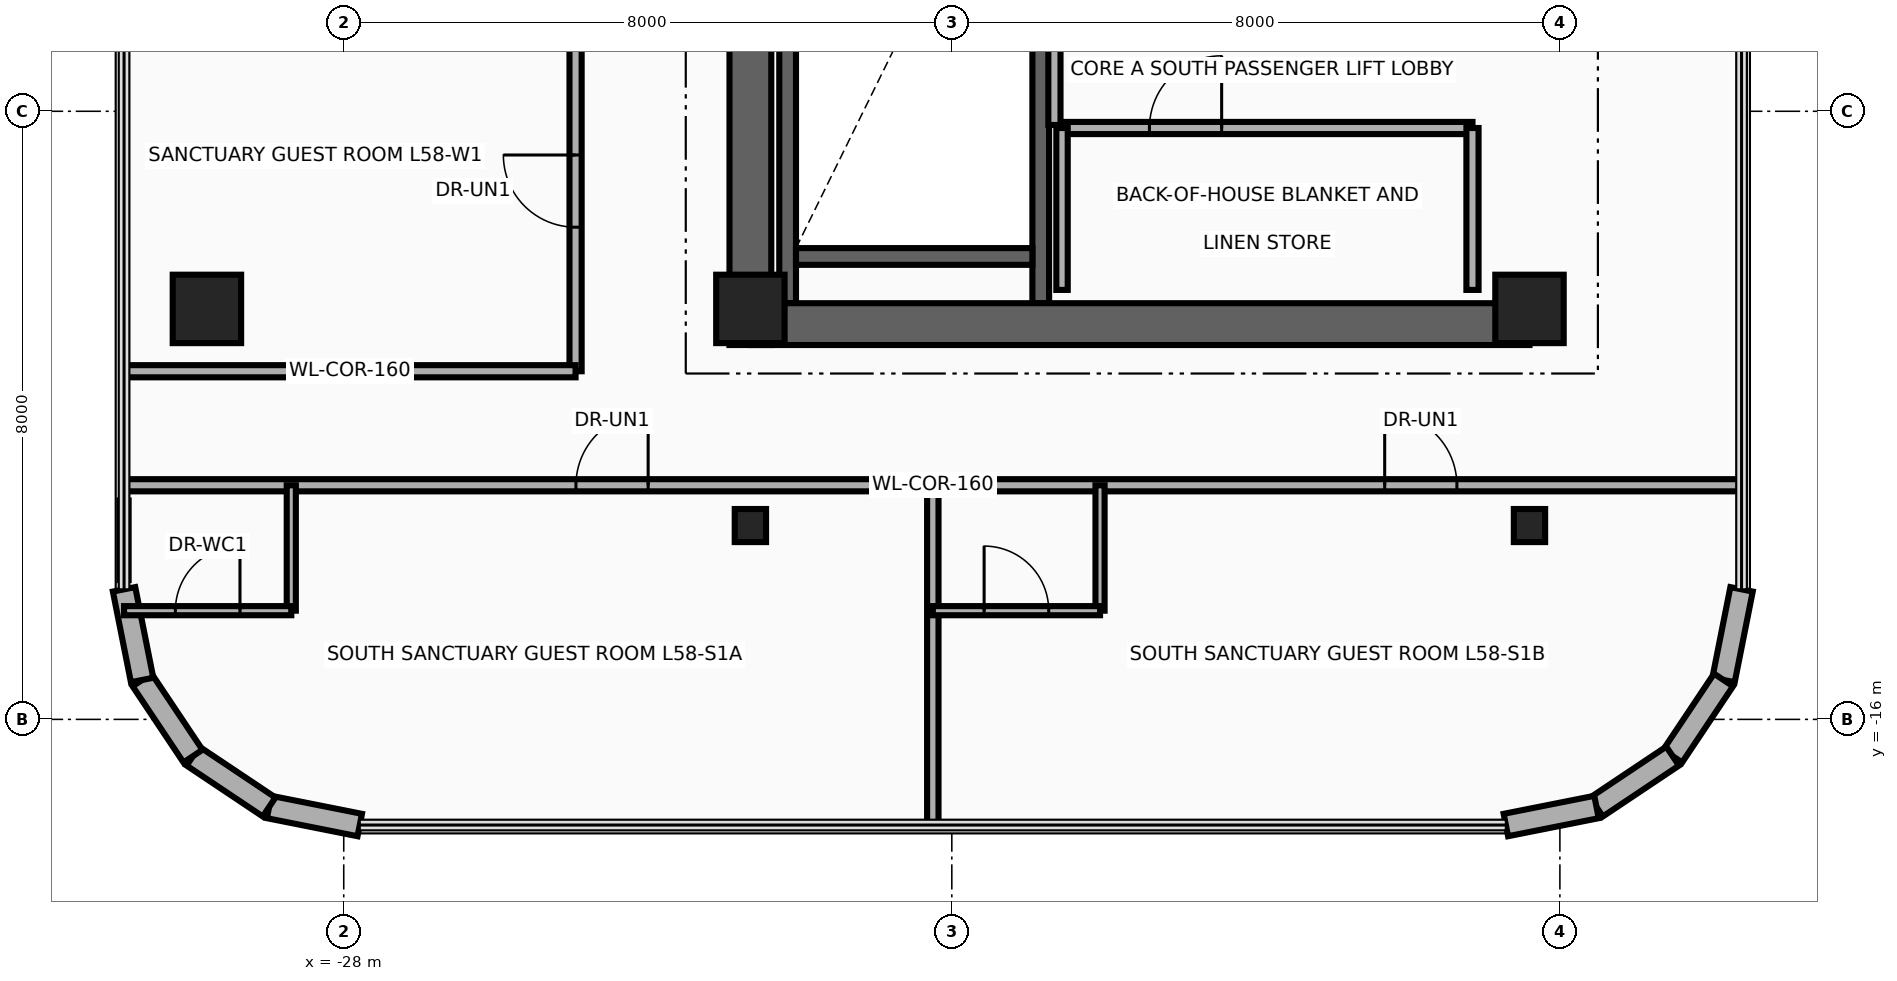
"""IFC4 building model, lengths in metres.
Left out: names, types, materials, properties, quantities, classifications, styles, units other than length and angle.
Written with IfcOpenShell. Run it as: python <this file> out.ifc"""

import sys

from ifc_helpers import new_model, si_unit, direction, frame, frame_2d, origin, origin_2d, place, context, subcontext, project, spatial, rectangle, i_section, extrude, source, transform, mapped, element, fill, save


model = new_model("IFC4")
c1 = context("Model", 3, precision=1e-05, world=origin(), true_north=direction((0.0, 1.0)))
c2 = subcontext(c1, "Body", "Model", "MODEL_VIEW")
j1 = project(units=[si_unit("LENGTHUNIT", "METRE"), si_unit("PLANEANGLEUNIT", "RADIAN")], contexts=[c1])
p1 = place(None, origin())
s1 = spatial("IfcSite", under=j1, at=p1, CompositionType="ELEMENT")
p2 = place(p1, origin())
s2 = spatial("IfcBuilding", under=s1, at=p2, CompositionType="ELEMENT")
p3 = place(p2, frame((0.0, 0.0, 226.5)))
s3 = spatial("IfcBuildingStorey", under=s2, at=p3, CompositionType="ELEMENT", Elevation=226.5)
for number, where, z_axis, x_axis in (
    (1, (-22.16, -10.525, 0.0), (0.0, 0.0, 1.0), (0.0, 1.0, 0.0)),
    (2, (-18.83, -10.525, 0.0), (0.0, 0.0, 1.0), (0.0, 1.0, 0.0)),
):
    element("IfcWall", number, at=place(p3, frame(where, z_axis=z_axis, x_axis=x_axis)), inside=s3, PredefinedType="SHEAR", context=c2, shape_type="SweptSolid", body=[
        extrude(rectangle(XDim=8.745, YDim=0.22, at=frame_2d((4.373, 0.0))), origin(), (0.0, 0.0, 1.0), 3.26),
    ])
p4 = place(p3, frame((-22.05, -9.91, 0.0), z_axis=(0.0, 0.0, 1.0), x_axis=(1.0, 0.0, 0.0)))
e3 = element("IfcWall", 3, at=p4, inside=s3, PredefinedType="SHEAR", context=c2, shape_type="SweptSolid", body=[
    extrude(rectangle(XDim=3.11, YDim=0.22, at=frame_2d((1.555, 0.0))), origin(), (0.0, 0.0, 1.0), 3.26),
])
p5 = place(p3, frame((-22.65, -11.075, 0.0), z_axis=(0.0, 0.0, 1.0), x_axis=(0.0, 1.0, 0.0)))
e4 = element("IfcWall", 4, at=p5, inside=s3, PredefinedType="SHEAR", context=c2, shape_type="SweptSolid", body=[
    extrude(rectangle(XDim=22.15, YDim=0.55, at=frame_2d((11.075, 0.0))), origin(), (0.0, 0.0, 1.0), 3.26),
])
p6 = place(p3, frame((-22.65, -10.8, 0.0), z_axis=(0.0, 0.0, 1.0), x_axis=(1.0, 0.0, 0.0)))
e5 = element("IfcWall", 5, at=p6, inside=s3, PredefinedType="SHEAR", context=c2, shape_type="SweptSolid", body=[
    extrude(rectangle(XDim=10.25, YDim=0.55, at=frame_2d((5.125, 0.0))), origin(), (0.0, 0.0, 1.0), 3.26),
])
m1 = source(origin(), c2, "Body", "SweptSolid", [
    extrude(rectangle(XDim=0.9, YDim=0.9, at=origin_2d()), origin(), (0.0, 0.0, 1.0), 3.5),
])
for number, where, z_axis, x_axis in (
    (6, (-29.8, -10.6, 0.0), (0.0, 0.0, 1.0), (1.0, 0.0, 0.0)),
    (7, (-22.65, -10.6, 0.0), (0.0, 0.0, 1.0), (1.0, 0.0, 0.0)),
    (8, (-12.4, -10.6, 0.0), (0.0, 0.0, 1.0), (1.0, 0.0, 0.0)),
):
    element("IfcColumn", number, at=place(p3, frame(where, z_axis=z_axis, x_axis=x_axis)), inside=s3, PredefinedType="COLUMN", context=c2, shape_type="MappedRepresentation", body=[
        mapped(m1, transform((0.0, 0.0, 0.0), x_axis=(1.0, 0.0, 0.0), y_axis=(0.0, 1.0, 0.0), z_axis=(0.0, 0.0, 1.0), scale=1.0)),
    ])
m2 = source(origin(), c2, "Body", "SweptSolid", [
    extrude(i_section(OverallWidth=0.412, OverallDepth=0.435, WebThickness=0.036, FlangeThickness=0.057, at=origin_2d()), origin(), (0.0, 0.0, 1.0), 3.5),
])
for number, where, z_axis, x_axis in (
    (9, (-22.65, -13.45, 0.0), (0.0, 0.0, 1.0), (1.0, 0.0, 0.0)),
    (10, (-12.4, -13.45, 0.0), (0.0, 0.0, 1.0), (1.0, 0.0, 0.0)),
):
    element("IfcColumn", number, at=place(p3, frame(where, z_axis=z_axis, x_axis=x_axis)), inside=s3, PredefinedType="COLUMN", context=c2, shape_type="MappedRepresentation", body=[
        mapped(m2, transform((0.0, 0.0, 0.0), x_axis=(1.0, 0.0, 0.0), y_axis=(0.0, 1.0, 0.0), z_axis=(0.0, 0.0, 1.0), scale=1.0)),
    ])
p7 = place(p3, frame((-9.61, -14.289, 0.0), z_axis=(0.0, 0.0, 1.0), x_axis=(-0.194996050505, -0.980804027463, 0.0)))
e11 = element("IfcWall", 11, at=p7, inside=s3, PredefinedType="SOLIDWALL", context=c2, shape_type="SweptSolid", body=[
    extrude(rectangle(XDim=1.216, YDim=0.3, at=frame_2d((0.608, 0.0))), origin(), (0.0, 0.0, 1.0), 3.26),
])
for number, where, z_axis, x_axis in (
    (12, (-9.847, -15.482, 0.0), (0.0, 0.0, 1.0), (-0.556, -0.831, 0.0)),
    (13, (-10.517, -16.483, 0.0), (0.0, 0.0, 1.0), (-0.831, -0.556, 0.0)),
):
    element("IfcWall", number, at=place(p3, frame(where, z_axis=z_axis, x_axis=x_axis)), inside=s3, PredefinedType="SOLIDWALL", context=c2, shape_type="SweptSolid", body=[
        extrude(rectangle(XDim=1.205, YDim=0.3, at=frame_2d((0.603, 0.0))), origin(), (0.0, 0.0, 1.0), 3.26),
    ])
for number, where, z_axis, x_axis in (
    (14, (-11.518, -17.153, 0.0), (0.0, 0.0, 1.0), (-0.981, -0.195, 0.0)),
    (15, (-27.789, -17.39, 0.0), (0.0, 0.0, 1.0), (-0.981, 0.195, 0.0)),
):
    element("IfcWall", number, at=place(p3, frame(where, z_axis=z_axis, x_axis=x_axis)), inside=s3, PredefinedType="SOLIDWALL", context=c2, shape_type="SweptSolid", body=[
        extrude(rectangle(XDim=1.216, YDim=0.3, at=frame_2d((0.608, 0.0))), origin(), (0.0, 0.0, 1.0), 3.26),
    ])
for number, where, z_axis, x_axis in (
    (16, (-28.982, -17.153, 0.0), (0.0, 0.0, 1.0), (-0.831, 0.556, 0.0)),
    (17, (-29.983, -16.483, 0.0), (0.0, 0.0, 1.0), (-0.556, 0.831, 0.0)),
):
    element("IfcWall", number, at=place(p3, frame(where, z_axis=z_axis, x_axis=x_axis)), inside=s3, PredefinedType="SOLIDWALL", context=c2, shape_type="SweptSolid", body=[
        extrude(rectangle(XDim=1.205, YDim=0.3, at=frame_2d((0.603, 0.0))), origin(), (0.0, 0.0, 1.0), 3.26),
    ])
p8 = place(p3, frame((-30.653, -15.482, 0.0), z_axis=(0.0, 0.0, 1.0), x_axis=(-0.194996050505, 0.980804027463, 0.0)))
e18 = element("IfcWall", 18, at=p8, inside=s3, PredefinedType="SOLIDWALL", context=c2, shape_type="SweptSolid", body=[
    extrude(rectangle(XDim=1.216, YDim=0.3, at=frame_2d((0.608, 0.0))), origin(), (0.0, 0.0, 1.0), 3.26),
])
p9 = place(p3, frame((-18.65, -8.18, 0.0), z_axis=(0.0, 0.0, 1.0), x_axis=(0.0, 1.0, 0.0)))
e19 = element("IfcWall", 19, at=p9, inside=s3, PredefinedType="PARTITIONING", context=c2, shape_type="SweptSolid", body=[
    extrude(rectangle(XDim=1.56, YDim=0.16, at=frame_2d((0.78, 0.0))), origin(), (0.0, 0.0, 1.0), 3.26),
])
p10 = place(p3, frame((-18.55, -8.22, 0.0), z_axis=(0.0, 0.0, 1.0), x_axis=(1.0, 0.0, 0.0)))
e20 = element("IfcWall", 20, at=p10, inside=s3, PredefinedType="PARTITIONING", context=c2, shape_type="SweptSolid", body=[
    extrude(rectangle(XDim=5.4, YDim=0.16, at=frame_2d((2.7, 0.0))), origin(), (0.0, 0.0, 1.0), 3.26),
])
p11 = place(p10, frame((1.15, 0.0, 0.0)))
e21 = element("IfcOpeningElement", 21, at=p11, cuts=e20, PredefinedType="OPENING", context=c2, shape_type="SweptSolid", body=[
    extrude(rectangle(XDim=0.95, YDim=2.15, at=frame_2d((0.475, 1.075))), frame((0.0, 0.095, 0.0), z_axis=(0.0, -1.0, 0.0), x_axis=(1.0, 0.0, 0.0)), (0.0, 0.0, 1.0), 0.19),
])
p12 = place(p3, frame((-18.55, -10.35, 0.0), z_axis=(0.0, 0.0, 1.0), x_axis=(0.0, 1.0, 0.0)))
e22 = element("IfcWall", 22, at=p12, inside=s3, PredefinedType="PARTITIONING", context=c2, shape_type="SweptSolid", body=[
    extrude(rectangle(XDim=2.13, YDim=0.15, at=frame_2d((1.065, 0.0))), origin(), (0.0, 0.0, 1.0), 3.26),
])
p13 = place(p3, frame((-13.15, -10.35, 0.0), z_axis=(0.0, 0.0, 1.0), x_axis=(0.0, 1.0, 0.0)))
e23 = element("IfcWall", 23, at=p13, inside=s3, PredefinedType="PARTITIONING", context=c2, shape_type="SweptSolid", body=[
    extrude(rectangle(XDim=2.13, YDim=0.16, at=frame_2d((1.065, 0.0))), origin(), (0.0, 0.0, 1.0), 3.26),
])
p14 = place(p3, frame((-24.95, -11.42, 0.0), z_axis=(0.0, 0.0, 1.0), x_axis=(0.0, 1.0, 0.0)))
e24 = element("IfcWall", 24, at=p14, inside=s3, PredefinedType="PARTITIONING", context=c2, shape_type="SweptSolid", body=[
    extrude(rectangle(XDim=20.22, YDim=0.16, at=frame_2d((10.11, 0.0))), origin(), (0.0, 0.0, 1.0), 2.544),
])
p15 = place(p14, frame((1.895, 0.0, 0.0)))
e25 = element("IfcOpeningElement", 25, at=p15, cuts=e24, PredefinedType="OPENING", context=c2, shape_type="SweptSolid", body=[
    extrude(rectangle(XDim=0.95, YDim=2.15, at=frame_2d((0.475, 1.075))), frame((0.0, 0.095, 0.0), z_axis=(0.0, -1.0, 0.0), x_axis=(1.0, 0.0, 0.0)), (0.0, 0.0, 1.0), 0.19),
])
p16 = place(p14, frame((8.635, 0.0, 0.0)))
e26 = element("IfcOpeningElement", 26, at=p16, cuts=e24, PredefinedType="OPENING", context=c2, shape_type="SweptSolid", body=[
    extrude(rectangle(XDim=0.95, YDim=2.15, at=frame_2d((0.475, 1.075))), frame((0.0, 0.095, 0.0), z_axis=(0.0, -1.0, 0.0), x_axis=(1.0, 0.0, 0.0)), (0.0, 0.0, 1.0), 0.19),
])
p17 = place(p14, frame((17.375, 0.0, 0.0)))
e27 = element("IfcOpeningElement", 27, at=p17, cuts=e24, PredefinedType="OPENING", context=c2, shape_type="SweptSolid", body=[
    extrude(rectangle(XDim=0.95, YDim=2.15, at=frame_2d((0.475, 1.075))), frame((0.0, 0.095, 0.0), z_axis=(0.0, -1.0, 0.0), x_axis=(1.0, 0.0, 0.0)), (0.0, 0.0, 1.0), 0.19),
])
p18 = place(p3, frame((-30.89, -12.92, 0.0), z_axis=(0.0, 0.0, 1.0), x_axis=(1.0, 0.0, 0.0)))
e28 = element("IfcWall", 28, at=p18, inside=s3, PredefinedType="PARTITIONING", context=c2, shape_type="SweptSolid", body=[
    extrude(rectangle(XDim=21.28, YDim=0.16, at=frame_2d((10.64, 0.0))), origin(), (0.0, 0.0, 1.0), 2.634),
])
p19 = place(p18, frame((5.945, 0.0, 0.0)))
e29 = element("IfcOpeningElement", 29, at=p19, cuts=e28, PredefinedType="OPENING", context=c2, shape_type="SweptSolid", body=[
    extrude(rectangle(XDim=0.95, YDim=2.15, at=frame_2d((0.475, 1.075))), frame((0.0, 0.095, 0.0), z_axis=(0.0, -1.0, 0.0), x_axis=(1.0, 0.0, 0.0)), (0.0, 0.0, 1.0), 0.19),
])
p20 = place(p18, frame((16.585, 0.0, 0.0)))
e30 = element("IfcOpeningElement", 30, at=p20, cuts=e28, PredefinedType="OPENING", context=c2, shape_type="SweptSolid", body=[
    extrude(rectangle(XDim=0.95, YDim=2.15, at=frame_2d((0.475, 1.075))), frame((0.0, 0.095, 0.0), z_axis=(0.0, -1.0, 0.0), x_axis=(1.0, 0.0, 0.0)), (0.0, 0.0, 1.0), 0.19),
])
p21 = place(p3, frame((-20.25, -17.39, 0.0), z_axis=(0.0, 0.0, 1.0), x_axis=(0.0, 1.0, 0.0)))
e31 = element("IfcWall", 31, at=p21, inside=s3, PredefinedType="PARTITIONING", context=c2, shape_type="SweptSolid", body=[
    extrude(rectangle(XDim=4.47, YDim=0.15, at=frame_2d((2.235, 0.0))), origin(), (0.0, 0.0, 1.0), 2.706),
])
p22 = place(p3, frame((-28.69, -14.57, 0.0), z_axis=(0.0, 0.0, 1.0), x_axis=(0.0, 1.0, 0.0)))
e32 = element("IfcWall", 32, at=p22, inside=s3, PredefinedType="PARTITIONING", context=c2, shape_type="SweptSolid", body=[
    extrude(rectangle(XDim=1.65, YDim=0.12, at=frame_2d((0.825, 0.0))), origin(), (0.0, 0.0, 1.0), 3.26),
])
p23 = place(p3, frame((-30.89, -14.57, 0.0), z_axis=(0.0, 0.0, 1.0), x_axis=(1.0, 0.0, 0.0)))
e33 = element("IfcWall", 33, at=p23, inside=s3, PredefinedType="PARTITIONING", context=c2, shape_type="SweptSolid", body=[
    extrude(rectangle(XDim=2.2, YDim=0.12, at=frame_2d((1.1, 0.0))), origin(), (0.0, 0.0, 1.0), 3.26),
])
p24 = place(p23, frame((0.675, 0.0, 0.0)))
e34 = element("IfcOpeningElement", 34, at=p24, cuts=e33, PredefinedType="OPENING", context=c2, shape_type="SweptSolid", body=[
    extrude(rectangle(XDim=0.85, YDim=2.1, at=frame_2d((0.425, 1.05))), frame((0.0, 0.075, 0.0), z_axis=(0.0, -1.0, 0.0), x_axis=(1.0, 0.0, 0.0)), (0.0, 0.0, 1.0), 0.15),
])
p25 = place(p3, frame((-30.89, -14.167, 0.0), z_axis=(0.0, 0.0, 1.0), x_axis=(0.0, 1.0, 0.0)))
e35 = element("IfcWall", 35, at=p25, inside=s3, PredefinedType="PARTITIONING", context=c2, shape_type="SweptSolid", body=[
    extrude(rectangle(XDim=1.047, YDim=0.12, at=frame_2d((0.523, 0.0))), origin(), (0.0, 0.0, 1.0), 3.26),
])
p26 = place(p3, frame((-18.05, -14.57, 0.0), z_axis=(0.0, 0.0, 1.0), x_axis=(0.0, 1.0, 0.0)))
e36 = element("IfcWall", 36, at=p26, inside=s3, PredefinedType="PARTITIONING", context=c2, shape_type="SweptSolid", body=[
    extrude(rectangle(XDim=1.65, YDim=0.12, at=frame_2d((0.825, 0.0))), origin(), (0.0, 0.0, 1.0), 2.706),
])
p27 = place(p3, frame((-20.25, -14.57, 0.0), z_axis=(0.0, 0.0, 1.0), x_axis=(1.0, 0.0, 0.0)))
e37 = element("IfcWall", 37, at=p27, inside=s3, PredefinedType="PARTITIONING", context=c2, shape_type="SweptSolid", body=[
    extrude(rectangle(XDim=2.2, YDim=0.12, at=frame_2d((1.1, 0.0))), origin(), (0.0, 0.0, 1.0), 3.26),
])
p28 = place(p27, frame((0.675, 0.0, 0.0)))
e38 = element("IfcOpeningElement", 38, at=p28, cuts=e37, PredefinedType="OPENING", context=c2, shape_type="SweptSolid", body=[
    extrude(rectangle(XDim=0.85, YDim=2.1, at=frame_2d((0.425, 1.05))), frame((0.0, 0.075, 0.0), z_axis=(0.0, -1.0, 0.0), x_axis=(1.0, 0.0, 0.0)), (0.0, 0.0, 1.0), 0.15),
])
p29 = place(p3, frame((-30.89, -11.42, 0.0), z_axis=(0.0, 0.0, 1.0), x_axis=(1.0, 0.0, 0.0)))
e39 = element("IfcWall", 39, at=p29, inside=s3, PredefinedType="PARTITIONING", context=c2, shape_type="SweptSolid", body=[
    extrude(rectangle(XDim=5.94, YDim=0.16, at=frame_2d((2.97, 0.0))), origin(), (0.0, 0.0, 1.0), 3.26),
])
p30 = place(p11, origin())
e40 = element("IfcDoor", 40, at=p30, inside=s3, OperationType="SINGLE_SWING_RIGHT", PredefinedType="DOOR", context=c2, shape_type="SweptSolid", body=[
    extrude(rectangle(XDim=0.95, YDim=2.15, at=frame_2d((0.475, 1.075))), frame((0.0, 0.025, 0.0), z_axis=(0.0, -1.0, 0.0), x_axis=(1.0, 0.0, 0.0)), (0.0, 0.0, 1.0), 0.05),
])
fill(e21, e40)
p31 = place(p15, origin())
e41 = element("IfcDoor", 41, at=p31, inside=s3, OperationType="SINGLE_SWING_RIGHT", PredefinedType="DOOR", context=c2, shape_type="SweptSolid", body=[
    extrude(rectangle(XDim=0.95, YDim=2.15, at=frame_2d((0.475, 1.075))), frame((0.0, 0.025, 0.0), z_axis=(0.0, -1.0, 0.0), x_axis=(1.0, 0.0, 0.0)), (0.0, 0.0, 1.0), 0.05),
])
fill(e25, e41)
p32 = place(p19, origin())
e42 = element("IfcDoor", 42, at=p32, inside=s3, OperationType="SINGLE_SWING_RIGHT", PredefinedType="DOOR", context=c2, shape_type="SweptSolid", body=[
    extrude(rectangle(XDim=0.95, YDim=2.15, at=frame_2d((0.475, 1.075))), frame((0.0, 0.025, 0.0), z_axis=(0.0, -1.0, 0.0), x_axis=(1.0, 0.0, 0.0)), (0.0, 0.0, 1.0), 0.05),
])
fill(e29, e42)
p33 = place(p24, origin())
e43 = element("IfcDoor", 43, at=p33, inside=s3, OperationType="SINGLE_SWING_LEFT", PredefinedType="DOOR", context=c2, shape_type="SweptSolid", body=[
    extrude(rectangle(XDim=0.85, YDim=2.1, at=frame_2d((0.425, 1.05))), frame((0.0, 0.025, 0.0), z_axis=(0.0, -1.0, 0.0), x_axis=(1.0, 0.0, 0.0)), (0.0, 0.0, 1.0), 0.05),
])
fill(e34, e43)
p34 = place(p20, origin())
e44 = element("IfcDoor", 44, at=p34, inside=s3, OperationType="SINGLE_SWING_RIGHT", PredefinedType="DOOR", context=c2, shape_type="SweptSolid", body=[
    extrude(rectangle(XDim=0.95, YDim=2.15, at=frame_2d((0.475, 1.075))), frame((0.0, 0.025, 0.0), z_axis=(0.0, -1.0, 0.0), x_axis=(1.0, 0.0, 0.0)), (0.0, 0.0, 1.0), 0.05),
])
fill(e30, e44)
p35 = place(p28, origin())
e45 = element("IfcDoor", 45, at=p35, inside=s3, OperationType="SINGLE_SWING_LEFT", PredefinedType="DOOR", context=c2, shape_type="SweptSolid", body=[
    extrude(rectangle(XDim=0.85, YDim=2.1, at=frame_2d((0.425, 1.05))), frame((0.0, 0.025, 0.0), z_axis=(0.0, -1.0, 0.0), x_axis=(1.0, 0.0, 0.0)), (0.0, 0.0, 1.0), 0.05),
])
fill(e38, e45)
save(model, sys.argv[1])
